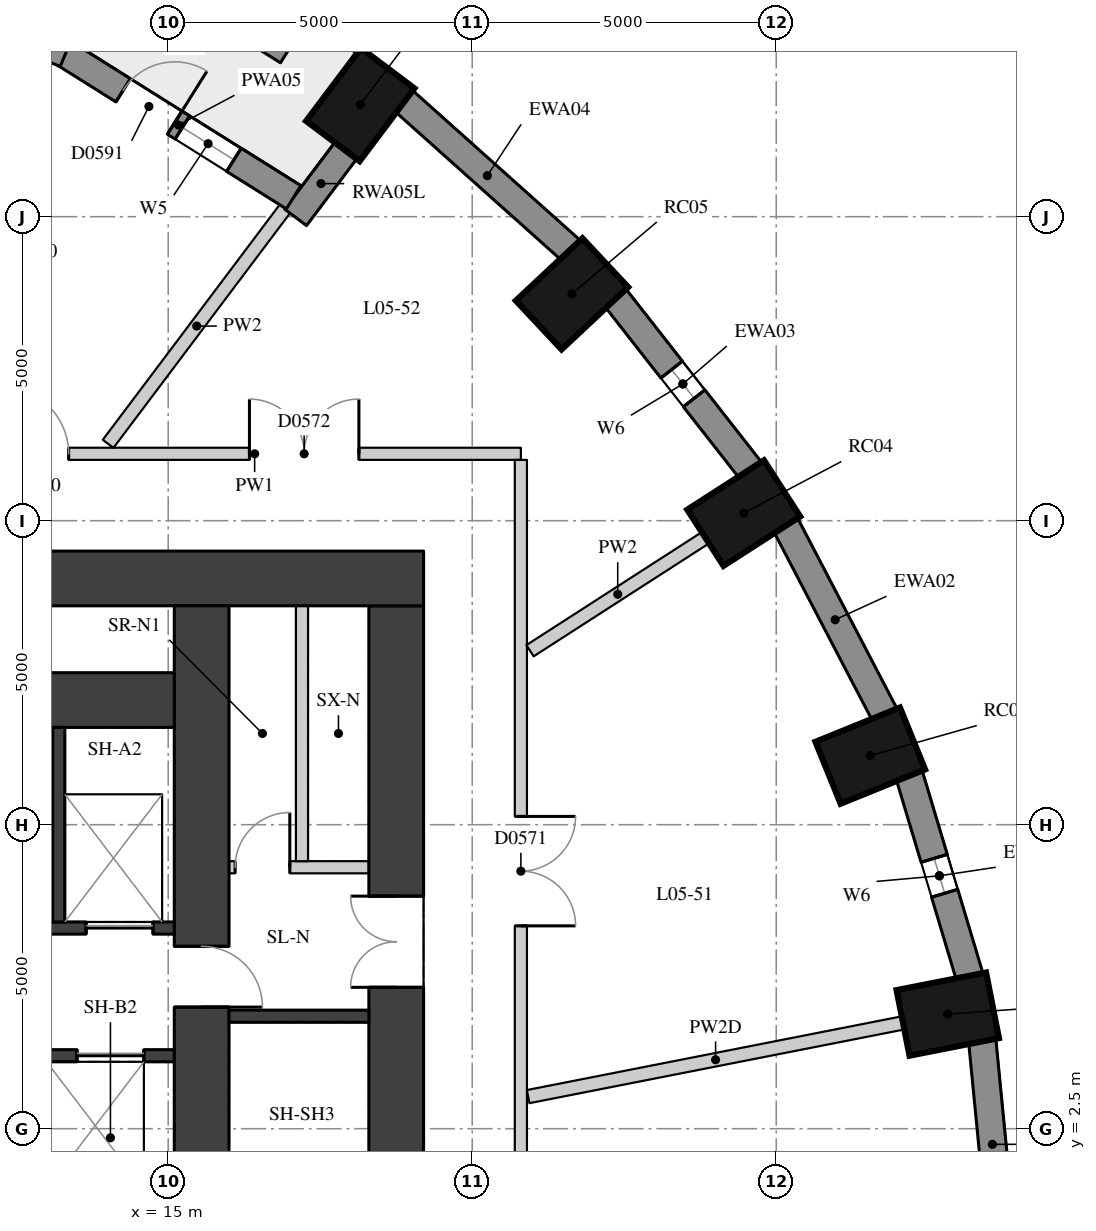
"""IFC4 building model, lengths in metres.
Left out: names, types, materials, properties, quantities, classifications, styles, units other than length and angle.
Written with IfcOpenShell. Run it as: python <this file> out.ifc"""

import sys

from ifc_helpers import new_model, si_unit, direction, frame, frame_2d, origin, origin_2d, place, context, subcontext, project, spatial, rectangle, extrude, element, fill, save


model = new_model("IFC4")
c1 = context("Model", 3, precision=1e-05, world=origin(), true_north=direction((0.0, 1.0)))
c2 = subcontext(c1, "Body", "Model", "MODEL_VIEW")
j1 = project(units=[si_unit("LENGTHUNIT", "METRE"), si_unit("PLANEANGLEUNIT", "RADIAN")], contexts=[c1])
p1 = place(None, origin())
s1 = spatial("IfcSite", under=j1, at=p1, CompositionType="ELEMENT")
p2 = place(p1, origin())
s2 = spatial("IfcBuilding", under=s1, at=p2, CompositionType="ELEMENT")
p3 = place(p2, frame((0.0, 0.0, 25.0)))
s3 = spatial("IfcBuildingStorey", under=s2, at=p3, CompositionType="ELEMENT", Elevation=25.0)
for number, where, z_axis, x_axis in (
    (1, (27.821, 4.385, 0.0), (0.0, 0.0, 1.0), (0.981, 0.193, 0.0)),
    (2, (26.546, 8.636, 0.0), (0.0, 0.0, 1.0), (0.927, 0.376, 0.0)),
    (3, (24.465, 12.625, 0.0), (0.0, 0.0, 1.0), (0.841, 0.541, 0.0)),
    (4, (21.641, 16.23, 0.0), (0.0, 0.0, 1.0), (0.73, 0.683, 0.0)),
    (5, (18.159, 19.343, 0.0), (0.0, 0.0, 1.0), (0.601, 0.799, 0.0)),
):
    element("IfcColumn", number, at=place(p3, frame(where, z_axis=z_axis, x_axis=x_axis)), inside=s3, PredefinedType="COLUMN", context=c2, shape_type="SweptSolid", body=[
        extrude(rectangle(XDim=1.5, YDim=1.1, at=origin_2d()), origin(), (0.0, 0.0, 1.0), 3.3),
    ])
p4 = place(p3, frame((28.722, 0.53, 0.0), z_axis=(0.0, 0.0, 1.0), x_axis=(-0.097389581596, 0.995246336038, 0.0)))
e6 = element("IfcWall", 6, at=p4, inside=s3, PredefinedType="SOLIDWALL", context=c2, shape_type="SweptSolid", body=[
    extrude(rectangle(XDim=3.442, YDim=0.45, at=frame_2d((1.721, 0.0))), origin(), (0.0, 0.0, 1.0), 3.02),
])
p5 = place(p3, frame((28.182, 4.996, 0.0), z_axis=(0.0, 0.0, 1.0), x_axis=(-0.287064133733, 0.957911364963, 0.0)))
e7 = element("IfcWall", 7, at=p5, inside=s3, PredefinedType="SOLIDWALL", context=c2, shape_type="SweptSolid", body=[
    extrude(rectangle(XDim=3.473, YDim=0.45, at=frame_2d((1.737, 0.0))), origin(), (0.0, 0.0, 1.0), 3.02),
])
p6 = place(p5, frame((1.437, 0.0, 0.4)))
e8 = element("IfcOpeningElement", 8, at=p6, cuts=e7, PredefinedType="OPENING", context=c2, shape_type="SweptSolid", body=[
    extrude(rectangle(XDim=0.6, YDim=1.75, at=frame_2d((0.3, 0.875))), frame((0.0, 0.235, 0.0), z_axis=(0.0, -1.0, 0.0), x_axis=(1.0, 0.0, 0.0)), (0.0, 0.0, 1.0), 0.47),
])
p7 = place(p3, frame((26.786, 9.305, 0.0), z_axis=(0.0, 0.0, 1.0), x_axis=(-0.462492775226, 0.886623050041, 0.0)))
e9 = element("IfcWall", 9, at=p7, inside=s3, PredefinedType="SOLIDWALL", context=c2, shape_type="SweptSolid", body=[
    extrude(rectangle(XDim=3.532, YDim=0.45, at=frame_2d((1.766, 0.0))), origin(), (0.0, 0.0, 1.0), 3.02),
])
p8 = place(p3, frame((24.578, 13.328, 0.0), z_axis=(0.0, 0.0, 1.0), x_axis=(-0.616661975264, 0.787228053529, 0.0)))
e10 = element("IfcWall", 10, at=p8, inside=s3, PredefinedType="SOLIDWALL", context=c2, shape_type="SweptSolid", body=[
    extrude(rectangle(XDim=3.61, YDim=0.45, at=frame_2d((1.805, 0.0))), origin(), (0.0, 0.0, 1.0), 3.02),
])
p9 = place(p8, frame((1.505, 0.0, 0.4)))
e11 = element("IfcOpeningElement", 11, at=p9, cuts=e10, PredefinedType="OPENING", context=c2, shape_type="SweptSolid", body=[
    extrude(rectangle(XDim=0.6, YDim=1.75, at=frame_2d((0.3, 0.875))), frame((0.0, 0.235, 0.0), z_axis=(0.0, -1.0, 0.0), x_axis=(1.0, 0.0, 0.0)), (0.0, 0.0, 1.0), 0.47),
])
p10 = place(p3, frame((21.627, 16.943, 0.0), z_axis=(0.0, 0.0, 1.0), x_axis=(-0.745526233716, 0.66647628228, 0.0)))
e12 = element("IfcWall", 12, at=p10, inside=s3, PredefinedType="SOLIDWALL", context=c2, shape_type="SweptSolid", body=[
    extrude(rectangle(XDim=3.697, YDim=0.45, at=frame_2d((1.848, 0.0))), origin(), (0.0, 0.0, 1.0), 3.02),
])
p11 = place(p3, frame((17.932, 18.6, 0.0), z_axis=(0.0, 0.0, 1.0), x_axis=(-0.601262851241, -0.799051302306, 0.0)))
e13 = element("IfcWall", 13, at=p11, inside=s3, PredefinedType="SOLIDWALL", context=c2, shape_type="SweptSolid", body=[
    extrude(rectangle(XDim=1.391, YDim=0.45, at=frame_2d((0.696, 0.0))), origin(), (0.0, 0.0, 1.0), 3.02),
])
p12 = place(p3, frame((17.062, 17.819, 0.0), z_axis=(0.0, 0.0, 1.0), x_axis=(-0.846990101364, 0.531608660757, 0.0)))
e14 = element("IfcWall", 14, at=p12, inside=s3, PredefinedType="SOLIDWALL", context=c2, shape_type="SweptSolid", body=[
    extrude(rectangle(XDim=4.469, YDim=0.45, at=frame_2d((2.234, 0.0))), origin(), (0.0, 0.0, 1.0), 3.02),
])
p13 = place(p12, frame((1.159, 0.0, 0.4)))
e15 = element("IfcOpeningElement", 15, at=p13, cuts=e14, PredefinedType="OPENING", context=c2, shape_type="SweptSolid", body=[
    extrude(rectangle(XDim=1.0, YDim=1.75, at=frame_2d((0.5, 0.875))), frame((0.0, 0.235, 0.0), z_axis=(0.0, -1.0, 0.0), x_axis=(1.0, 0.0, 0.0)), (0.0, 0.0, 1.0), 0.47),
])
p14 = place(p12, frame((2.31, 0.0, 0.0)))
e16 = element("IfcOpeningElement", 16, at=p14, cuts=e14, PredefinedType="OPENING", context=c2, shape_type="SweptSolid", body=[
    extrude(rectangle(XDim=1.0, YDim=2.15, at=frame_2d((0.5, 1.075))), frame((0.0, 0.235, 0.0), z_axis=(0.0, -1.0, 0.0), x_axis=(1.0, 0.0, 0.0)), (0.0, 0.0, 1.0), 0.47),
])
p15 = place(p3, frame((13.31, 20.178, 0.0), z_axis=(0.0, 0.0, 1.0), x_axis=(-0.922634412489, 0.385675693935, 0.0)))
e17 = element("IfcWall", 17, at=p15, inside=s3, PredefinedType="SOLIDWALL", context=c2, shape_type="SweptSolid", body=[
    extrude(rectangle(XDim=4.577, YDim=0.45, at=frame_2d((2.288, 0.0))), origin(), (0.0, 0.0, 1.0), 3.02),
])
p16 = place(p15, frame((1.213, 0.0, 0.4)))
e18 = element("IfcOpeningElement", 18, at=p16, cuts=e17, PredefinedType="OPENING", context=c2, shape_type="SweptSolid", body=[
    extrude(rectangle(XDim=1.0, YDim=1.75, at=frame_2d((0.5, 0.875))), frame((0.0, 0.235, 0.0), z_axis=(0.0, -1.0, 0.0), x_axis=(1.0, 0.0, 0.0)), (0.0, 0.0, 1.0), 0.47),
])
p17 = place(p15, frame((2.363, 0.0, 0.0)))
e19 = element("IfcOpeningElement", 19, at=p17, cuts=e17, PredefinedType="OPENING", context=c2, shape_type="SweptSolid", body=[
    extrude(rectangle(XDim=1.0, YDim=2.15, at=frame_2d((0.5, 1.075))), frame((0.0, 0.235, 0.0), z_axis=(0.0, -1.0, 0.0), x_axis=(1.0, 0.0, 0.0)), (0.0, 0.0, 1.0), 0.47),
])
p18 = place(p3, frame((17.032, 20.328, 0.0), z_axis=(0.0, 0.0, 1.0), x_axis=(-0.847609446823, 0.530620604252, 0.0)))
e20 = element("IfcWall", 20, at=p18, inside=s3, PredefinedType="USERDEFINED", context=c2, shape_type="SweptSolid", body=[
    extrude(rectangle(XDim=1.8, YDim=0.7, at=frame_2d((0.9, 0.0))), origin(), (0.0, 0.0, 1.0), 0.75),
])
p19 = place(p3, frame((18.75, -11.1, 0.0), z_axis=(0.0, 0.0, 1.0), x_axis=(0.0, 1.0, 0.0)))
e21 = element("IfcWall", 21, at=p19, inside=s3, PredefinedType="SHEAR", context=c2, shape_type="SweptSolid", body=[
    extrude(rectangle(XDim=22.2, YDim=0.9, at=frame_2d((11.1, 0.0))), origin(), (0.0, 0.0, 1.0), 3.02),
])
p20 = place(p19, frame((15.925, 0.0, 0.0)))
e22 = element("IfcOpeningElement", 22, at=p20, cuts=e21, PredefinedType="OPENING", context=c2, shape_type="SweptSolid", body=[
    extrude(rectangle(XDim=1.5, YDim=2.1, at=frame_2d((0.75, 1.05))), frame((0.0, 0.46, 0.0), z_axis=(0.0, -1.0, 0.0), x_axis=(1.0, 0.0, 0.0)), (0.0, 0.0, 1.0), 0.92),
])
p21 = place(p19, frame((4.525, 0.0, 0.0)))
e23 = element("IfcOpeningElement", 23, at=p21, cuts=e21, PredefinedType="OPENING", context=c2, shape_type="SweptSolid", body=[
    extrude(rectangle(XDim=1.5, YDim=2.1, at=frame_2d((0.75, 1.05))), frame((0.0, 0.46, 0.0), z_axis=(0.0, -1.0, 0.0), x_axis=(1.0, 0.0, 0.0)), (0.0, 0.0, 1.0), 0.92),
])
p22 = place(p3, frame((4.0, 11.55, 0.0), z_axis=(0.0, 0.0, 1.0), x_axis=(1.0, 0.0, 0.0)))
e24 = element("IfcWall", 24, at=p22, inside=s3, PredefinedType="SHEAR", context=c2, shape_type="SweptSolid", body=[
    extrude(rectangle(XDim=15.2, YDim=0.9, at=frame_2d((7.6, 0.0))), origin(), (0.0, 0.0, 1.0), 3.02),
])
p23 = place(p3, frame((15.55, -11.1, 0.0), z_axis=(0.0, 0.0, 1.0), x_axis=(0.0, 1.0, 0.0)))
e25 = element("IfcWall", 25, at=p23, inside=s3, PredefinedType="SHEAR", context=c2, shape_type="SweptSolid", body=[
    extrude(rectangle(XDim=22.2, YDim=0.9, at=frame_2d((11.1, 0.0))), origin(), (0.0, 0.0, 1.0), 3.02),
])
p24 = place(p23, frame((15.6, 0.0, 0.0)))
e26 = element("IfcOpeningElement", 26, at=p24, cuts=e25, PredefinedType="OPENING", context=c2, shape_type="SweptSolid", body=[
    extrude(rectangle(XDim=1.0, YDim=2.1, at=frame_2d((0.5, 1.05))), frame((0.0, 0.46, 0.0), z_axis=(0.0, -1.0, 0.0), x_axis=(1.0, 0.0, 0.0)), (0.0, 0.0, 1.0), 0.92),
])
p25 = place(p23, frame((5.6, 0.0, 0.0)))
e27 = element("IfcOpeningElement", 27, at=p25, cuts=e25, PredefinedType="OPENING", context=c2, shape_type="SweptSolid", body=[
    extrude(rectangle(XDim=1.0, YDim=2.1, at=frame_2d((0.5, 1.05))), frame((0.0, 0.46, 0.0), z_axis=(0.0, -1.0, 0.0), x_axis=(1.0, 0.0, 0.0)), (0.0, 0.0, 1.0), 0.92),
])
p26 = place(p3, frame((4.9, 9.55, 0.0), z_axis=(0.0, 0.0, 1.0), x_axis=(1.0, 0.0, 0.0)))
e28 = element("IfcWall", 28, at=p26, inside=s3, PredefinedType="SHEAR", context=c2, shape_type="SweptSolid", body=[
    extrude(rectangle(XDim=10.2, YDim=0.9, at=frame_2d((5.1, 0.0))), origin(), (0.0, 0.0, 1.0), 3.02),
])
p27 = place(p3, frame((4.9, 5.8, 0.0), z_axis=(0.0, 0.0, 1.0), x_axis=(1.0, 0.0, 0.0)))
e29 = element("IfcWall", 29, at=p27, inside=s3, PredefinedType="SHEAR", context=c2, shape_type="SweptSolid", body=[
    extrude(rectangle(XDim=10.2, YDim=0.2, at=frame_2d((5.1, 0.0))), origin(), (0.0, 0.0, 1.0), 3.02),
])
p28 = place(p27, frame((6.75, 0.0, 0.0)))
e30 = element("IfcOpeningElement", 30, at=p28, cuts=e29, PredefinedType="OPENING", context=c2, shape_type="SweptSolid", body=[
    extrude(rectangle(XDim=1.1, YDim=2.1, at=frame_2d((0.55, 1.05))), frame((0.0, 0.11, 0.0), z_axis=(0.0, -1.0, 0.0), x_axis=(1.0, 0.0, 0.0)), (0.0, 0.0, 1.0), 0.22),
])
p29 = place(p27, frame((8.75, 0.0, 0.0)))
e31 = element("IfcOpeningElement", 31, at=p29, cuts=e29, PredefinedType="OPENING", context=c2, shape_type="SweptSolid", body=[
    extrude(rectangle(XDim=1.1, YDim=2.1, at=frame_2d((0.55, 1.05))), frame((0.0, 0.11, 0.0), z_axis=(0.0, -1.0, 0.0), x_axis=(1.0, 0.0, 0.0)), (0.0, 0.0, 1.0), 0.22),
])
p30 = place(p3, frame((4.9, 3.7, 0.0), z_axis=(0.0, 0.0, 1.0), x_axis=(1.0, 0.0, 0.0)))
e32 = element("IfcWall", 32, at=p30, inside=s3, PredefinedType="SHEAR", context=c2, shape_type="SweptSolid", body=[
    extrude(rectangle(XDim=10.2, YDim=0.2, at=frame_2d((5.1, 0.0))), origin(), (0.0, 0.0, 1.0), 3.02),
])
p31 = place(p30, frame((6.3, 0.0, 0.0)))
e33 = element("IfcOpeningElement", 33, at=p31, cuts=e32, PredefinedType="OPENING", context=c2, shape_type="SweptSolid", body=[
    extrude(rectangle(XDim=1.1, YDim=2.1, at=frame_2d((0.55, 1.05))), frame((0.0, 0.11, 0.0), z_axis=(0.0, -1.0, 0.0), x_axis=(1.0, 0.0, 0.0)), (0.0, 0.0, 1.0), 0.22),
])
p32 = place(p30, frame((8.6, 0.0, 0.0)))
e34 = element("IfcOpeningElement", 34, at=p32, cuts=e32, PredefinedType="OPENING", context=c2, shape_type="SweptSolid", body=[
    extrude(rectangle(XDim=1.1, YDim=2.1, at=frame_2d((0.55, 1.05))), frame((0.0, 0.11, 0.0), z_axis=(0.0, -1.0, 0.0), x_axis=(1.0, 0.0, 0.0)), (0.0, 0.0, 1.0), 0.22),
])
p33 = place(p3, frame((13.2, 5.9, 0.0), z_axis=(0.0, 0.0, 1.0), x_axis=(0.0, 1.0, 0.0)))
e35 = element("IfcWall", 35, at=p33, inside=s3, PredefinedType="SHEAR", context=c2, shape_type="SweptSolid", body=[
    extrude(rectangle(XDim=3.2, YDim=0.2, at=frame_2d((1.6, 0.0))), origin(), (0.0, 0.0, 1.0), 3.02),
])
p34 = place(p3, frame((16.0, 4.35, 0.0), z_axis=(0.0, 0.0, 1.0), x_axis=(1.0, 0.0, 0.0)))
e36 = element("IfcWall", 36, at=p34, inside=s3, PredefinedType="SHEAR", context=c2, shape_type="SweptSolid", body=[
    extrude(rectangle(XDim=2.3, YDim=0.2, at=frame_2d((1.15, 0.0))), origin(), (0.0, 0.0, 1.0), 3.02),
])
p35 = place(p3, frame((16.0, 6.8, 0.0), z_axis=(0.0, 0.0, 1.0), x_axis=(1.0, 0.0, 0.0)))
e37 = element("IfcWall", 37, at=p35, inside=s3, PredefinedType="PARTITIONING", context=c2, shape_type="SweptSolid", body=[
    extrude(rectangle(XDim=2.3, YDim=0.2, at=frame_2d((1.15, 0.0))), origin(), (0.0, 0.0, 1.0), 3.02),
])
p36 = place(p35, frame((0.1, 0.0, 0.0)))
e38 = element("IfcOpeningElement", 38, at=p36, cuts=e37, PredefinedType="OPENING", context=c2, shape_type="SweptSolid", body=[
    extrude(rectangle(XDim=0.9, YDim=2.1, at=frame_2d((0.45, 1.05))), frame((0.0, 0.11, 0.0), z_axis=(0.0, -1.0, 0.0), x_axis=(1.0, 0.0, 0.0)), (0.0, 0.0, 1.0), 0.22),
])
p37 = place(p3, frame((17.2, 6.9, 0.0), z_axis=(0.0, 0.0, 1.0), x_axis=(0.0, 1.0, 0.0)))
e39 = element("IfcWall", 39, at=p37, inside=s3, PredefinedType="PARTITIONING", context=c2, shape_type="SweptSolid", body=[
    extrude(rectangle(XDim=4.2, YDim=0.2, at=frame_2d((2.1, 0.0))), origin(), (0.0, 0.0, 1.0), 3.02),
])
p38 = place(p3, frame((12.043, 13.6, 0.0), z_axis=(0.0, 0.0, 1.0), x_axis=(1.0, 0.0, 0.0)))
e40 = element("IfcWall", 40, at=p38, inside=s3, PredefinedType="PARTITIONING", context=c2, shape_type="SweptSolid", body=[
    extrude(rectangle(XDim=8.757, YDim=0.2, at=frame_2d((4.378, 0.0))), origin(), (0.0, 0.0, 1.0), 3.02),
])
p39 = place(p38, frame((0.22, 0.0, 0.0)))
e41 = element("IfcOpeningElement", 41, at=p39, cuts=e40, PredefinedType="OPENING", context=c2, shape_type="SweptSolid", body=[
    extrude(rectangle(XDim=1.1, YDim=2.1, at=frame_2d((0.55, 1.05))), frame((0.0, 0.11, 0.0), z_axis=(0.0, -1.0, 0.0), x_axis=(1.0, 0.0, 0.0)), (0.0, 0.0, 1.0), 0.22),
])
p40 = place(p38, frame((4.293, 0.0, 0.0)))
e42 = element("IfcOpeningElement", 42, at=p40, cuts=e40, PredefinedType="OPENING", context=c2, shape_type="SweptSolid", body=[
    extrude(rectangle(XDim=1.8, YDim=2.1, at=frame_2d((0.9, 1.05))), frame((0.0, 0.11, 0.0), z_axis=(0.0, -1.0, 0.0), x_axis=(1.0, 0.0, 0.0)), (0.0, 0.0, 1.0), 0.22),
])
p41 = place(p3, frame((20.8, 13.5, 0.0), z_axis=(0.0, 0.0, 1.0), x_axis=(0.0, -1.0, 0.0)))
e43 = element("IfcWall", 43, at=p41, inside=s3, PredefinedType="PARTITIONING", context=c2, shape_type="SweptSolid", body=[
    extrude(rectangle(XDim=27.1, YDim=0.2, at=frame_2d((13.55, 0.0))), origin(), (0.0, 0.0, 1.0), 3.02),
])
p42 = place(p41, frame((14.149, 0.0, 0.0)))
e44 = element("IfcOpeningElement", 44, at=p42, cuts=e43, PredefinedType="OPENING", context=c2, shape_type="SweptSolid", body=[
    extrude(rectangle(XDim=1.8, YDim=2.1, at=frame_2d((0.9, 1.05))), frame((0.0, 0.11, 0.0), z_axis=(0.0, -1.0, 0.0), x_axis=(1.0, 0.0, 0.0)), (0.0, 0.0, 1.0), 0.22),
])
p43 = place(p41, frame((5.864, 0.0, 0.0)))
e45 = element("IfcOpeningElement", 45, at=p43, cuts=e43, PredefinedType="OPENING", context=c2, shape_type="SweptSolid", body=[
    extrude(rectangle(XDim=1.8, YDim=2.1, at=frame_2d((0.9, 1.05))), frame((0.0, 0.11, 0.0), z_axis=(0.0, -1.0, 0.0), x_axis=(1.0, 0.0, 0.0)), (0.0, 0.0, 1.0), 0.22),
])
p44 = place(p3, frame((27.085, 4.24, 0.0), z_axis=(0.0, 0.0, 1.0), x_axis=(-0.981207724218, -0.192954403772, 0.0)))
e46 = element("IfcWall", 46, at=p44, inside=s3, PredefinedType="PARTITIONING", context=c2, shape_type="SweptSolid", body=[
    extrude(rectangle(XDim=6.283, YDim=0.22, at=frame_2d((3.142, 0.0))), origin(), (0.0, 0.0, 1.0), 2.47),
])
p45 = place(p3, frame((23.835, 12.219, 0.0), z_axis=(0.0, 0.0, 1.0), x_axis=(-0.840694872373, -0.541509124176, 0.0)))
e47 = element("IfcWall", 47, at=p45, inside=s3, PredefinedType="PARTITIONING", context=c2, shape_type="SweptSolid", body=[
    extrude(rectangle(XDim=3.43, YDim=0.22, at=frame_2d((1.715, 0.0))), origin(), (0.0, 0.0, 1.0), 3.02),
])
p46 = place(p3, frame((16.927, 17.638, 0.0), z_axis=(0.0, 0.0, 1.0), x_axis=(-0.601183583641, -0.799110942711, 0.0)))
e48 = element("IfcWall", 48, at=p46, inside=s3, PredefinedType="PARTITIONING", context=c2, shape_type="SweptSolid", body=[
    extrude(rectangle(XDim=4.849, YDim=0.22, at=frame_2d((2.424, 0.0))), origin(), (0.0, 0.0, 1.0), 3.02),
])
p47 = place(p6, origin())
e49 = element("IfcWindow", 49, at=p47, inside=s3, PartitioningType="SINGLE_PANEL", PredefinedType="WINDOW", context=c2, shape_type="SweptSolid", body=[
    extrude(rectangle(XDim=0.6, YDim=1.75, at=frame_2d((0.3, 0.875))), frame((0.0, 0.035, 0.0), z_axis=(0.0, -1.0, 0.0), x_axis=(1.0, 0.0, 0.0)), (0.0, 0.0, 1.0), 0.06),
])
fill(e8, e49)
p48 = place(p9, origin())
e50 = element("IfcWindow", 50, at=p48, inside=s3, PartitioningType="SINGLE_PANEL", PredefinedType="WINDOW", context=c2, shape_type="SweptSolid", body=[
    extrude(rectangle(XDim=0.6, YDim=1.75, at=frame_2d((0.3, 0.875))), frame((0.0, 0.035, 0.0), z_axis=(0.0, -1.0, 0.0), x_axis=(1.0, 0.0, 0.0)), (0.0, 0.0, 1.0), 0.06),
])
fill(e11, e50)
p49 = place(p13, origin())
e51 = element("IfcWindow", 51, at=p49, inside=s3, PartitioningType="SINGLE_PANEL", PredefinedType="WINDOW", context=c2, shape_type="SweptSolid", body=[
    extrude(rectangle(XDim=1.0, YDim=1.75, at=frame_2d((0.5, 0.875))), frame((0.0, 0.035, 0.0), z_axis=(0.0, -1.0, 0.0), x_axis=(1.0, 0.0, 0.0)), (0.0, 0.0, 1.0), 0.06),
])
fill(e15, e51)
p50 = place(p14, frame((1.0, 0.0, 0.0), z_axis=(0.0, 0.0, 1.0), x_axis=(-1.0, 0.0, 0.0)))
e52 = element("IfcDoor", 52, at=p50, inside=s3, OperationType="SINGLE_SWING_RIGHT", PredefinedType="DOOR", context=c2, shape_type="SweptSolid", body=[
    extrude(rectangle(XDim=1.0, YDim=2.15, at=frame_2d((0.5, 1.075))), frame((0.0, 0.075, 0.0), z_axis=(0.0, -1.0, 0.0), x_axis=(1.0, 0.0, 0.0)), (0.0, 0.0, 1.0), 0.05),
])
fill(e16, e52)
p51 = place(p20, origin())
e53 = element("IfcDoor", 53, at=p51, inside=s3, OperationType="DOUBLE_DOOR_SINGLE_SWING", PredefinedType="DOOR", context=c2, shape_type="SweptSolid", body=[
    extrude(rectangle(XDim=1.5, YDim=2.1, at=frame_2d((0.75, 1.05))), frame((0.0, 0.025, 0.0), z_axis=(0.0, -1.0, 0.0), x_axis=(1.0, 0.0, 0.0)), (0.0, 0.0, 1.0), 0.05),
])
fill(e22, e53)
p52 = place(p29, origin())
e54 = element("IfcDoor", 54, at=p52, inside=s3, OperationType="DOUBLE_DOOR_SLIDING", PredefinedType="DOOR", context=c2, shape_type="SweptSolid", body=[
    extrude(rectangle(XDim=1.1, YDim=2.1, at=frame_2d((0.55, 1.05))), frame((0.0, 0.025, 0.0), z_axis=(0.0, -1.0, 0.0), x_axis=(1.0, 0.0, 0.0)), (0.0, 0.0, 1.0), 0.05),
])
fill(e31, e54)
p53 = place(p32, origin())
e55 = element("IfcDoor", 55, at=p53, inside=s3, OperationType="DOUBLE_DOOR_SLIDING", PredefinedType="DOOR", context=c2, shape_type="SweptSolid", body=[
    extrude(rectangle(XDim=1.1, YDim=2.1, at=frame_2d((0.55, 1.05))), frame((0.0, 0.025, 0.0), z_axis=(0.0, -1.0, 0.0), x_axis=(1.0, 0.0, 0.0)), (0.0, 0.0, 1.0), 0.05),
])
fill(e34, e55)
p54 = place(p24, origin())
e56 = element("IfcDoor", 56, at=p54, inside=s3, OperationType="SINGLE_SWING_RIGHT", PredefinedType="DOOR", context=c2, shape_type="SweptSolid", body=[
    extrude(rectangle(XDim=1.0, YDim=2.1, at=frame_2d((0.5, 1.05))), frame((0.0, 0.025, 0.0), z_axis=(0.0, -1.0, 0.0), x_axis=(1.0, 0.0, 0.0)), (0.0, 0.0, 1.0), 0.05),
])
fill(e26, e56)
p55 = place(p36, origin())
e57 = element("IfcDoor", 57, at=p55, inside=s3, OperationType="SINGLE_SWING_RIGHT", PredefinedType="DOOR", context=c2, shape_type="SweptSolid", body=[
    extrude(rectangle(XDim=0.9, YDim=2.1, at=frame_2d((0.45, 1.05))), frame((0.0, 0.025, 0.0), z_axis=(0.0, -1.0, 0.0), x_axis=(1.0, 0.0, 0.0)), (0.0, 0.0, 1.0), 0.05),
])
fill(e38, e57)
p56 = place(p39, origin())
e58 = element("IfcDoor", 58, at=p56, inside=s3, OperationType="SINGLE_SWING_LEFT", PredefinedType="DOOR", context=c2, shape_type="SweptSolid", body=[
    extrude(rectangle(XDim=1.1, YDim=2.1, at=frame_2d((0.55, 1.05))), frame((0.0, 0.025, 0.0), z_axis=(0.0, -1.0, 0.0), x_axis=(1.0, 0.0, 0.0)), (0.0, 0.0, 1.0), 0.05),
])
fill(e41, e58)
p57 = place(p43, origin())
e59 = element("IfcDoor", 59, at=p57, inside=s3, OperationType="DOUBLE_DOOR_SINGLE_SWING", PredefinedType="DOOR", context=c2, shape_type="SweptSolid", body=[
    extrude(rectangle(XDim=1.8, YDim=2.1, at=frame_2d((0.9, 1.05))), frame((0.0, 0.025, 0.0), z_axis=(0.0, -1.0, 0.0), x_axis=(1.0, 0.0, 0.0)), (0.0, 0.0, 1.0), 0.05),
])
fill(e45, e59)
p58 = place(p40, origin())
e60 = element("IfcDoor", 60, at=p58, inside=s3, OperationType="DOUBLE_DOOR_SINGLE_SWING", PredefinedType="DOOR", context=c2, shape_type="SweptSolid", body=[
    extrude(rectangle(XDim=1.8, YDim=2.1, at=frame_2d((0.9, 1.05))), frame((0.0, 0.025, 0.0), z_axis=(0.0, -1.0, 0.0), x_axis=(1.0, 0.0, 0.0)), (0.0, 0.0, 1.0), 0.05),
])
fill(e42, e60)
save(model, sys.argv[1])
